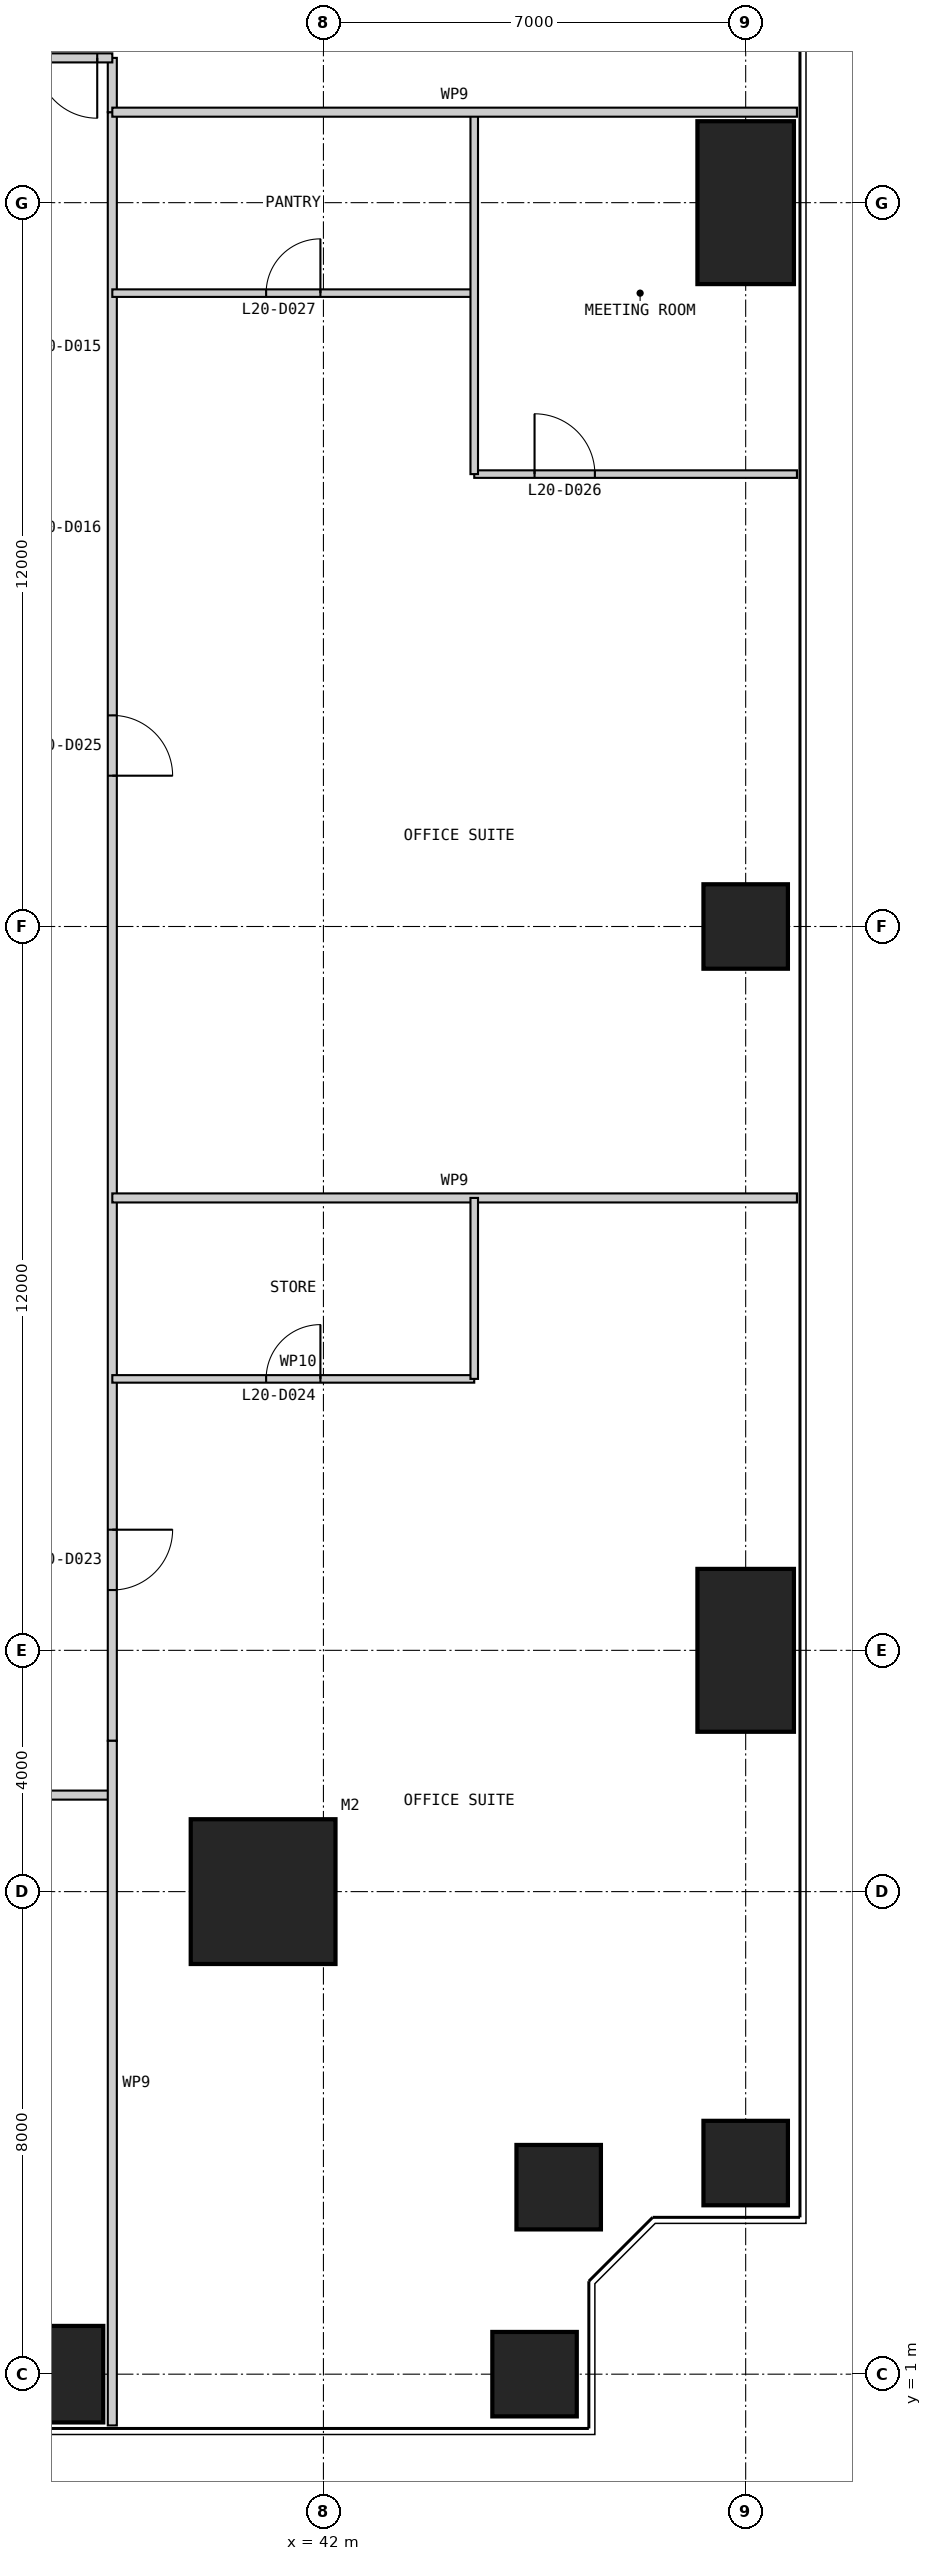
"""IFC4 building model, lengths in metres.
Left out: names, types, materials, properties, quantities, classifications, styles, units other than length and angle.
Written with IfcOpenShell. Run it as: python <this file> out.ifc"""

import sys

from ifc_helpers import new_model, si_unit, direction, frame, frame_2d, origin, origin_2d, place, context, subcontext, project, spatial, rectangle, extrude, element, fill, save


model = new_model("IFC4")
c1 = context("Model", 3, precision=1e-05, world=origin(), true_north=direction((0.0, 1.0)))
c2 = subcontext(c1, "Body", "Model", "MODEL_VIEW")
j1 = project(units=[si_unit("LENGTHUNIT", "METRE"), si_unit("PLANEANGLEUNIT", "RADIAN")], contexts=[c1])
p1 = place(None, origin())
s1 = spatial("IfcSite", under=j1, at=p1, CompositionType="ELEMENT")
p2 = place(p1, origin())
s2 = spatial("IfcBuilding", under=s1, at=p2, CompositionType="ELEMENT")
p3 = place(p2, frame((0.0, 0.0, 87.0)))
s3 = spatial("IfcBuildingStorey", under=s2, at=p3, CompositionType="ELEMENT", Elevation=87.0)
p4 = place(p3, frame((41.0, 9.0, 0.0), z_axis=(0.0, 0.0, 1.0), x_axis=(1.0, 0.0, 0.0)))
e1 = element("IfcColumn", 1, at=p4, inside=s3, PredefinedType="COLUMN", context=c2, shape_type="SweptSolid", body=[
    extrude(rectangle(XDim=2.4, YDim=2.4, at=origin_2d()), origin(), (0.0, 0.0, 1.0), 4.0),
])
p5 = place(p3, frame((37.0, 1.0, 0.0), z_axis=(0.0, 0.0, 1.0), x_axis=(1.0, 0.0, 0.0)))
e2 = element("IfcColumn", 2, at=p5, inside=s3, PredefinedType="COLUMN", context=c2, shape_type="SweptSolid", body=[
    extrude(rectangle(XDim=2.7, YDim=1.6, at=origin_2d()), origin(), (0.0, 0.0, 1.0), 4.0),
])
for number, where, z_axis, x_axis in (
    (3, (45.5, 1.0, 0.0), (0.0, 0.0, 1.0), (1.0, 0.0, 0.0)),
    (4, (45.9, 4.1, 0.0), (0.0, 0.0, 1.0), (1.0, 0.0, 0.0)),
    (5, (49.0, 4.5, 0.0), (0.0, 0.0, 1.0), (1.0, 0.0, 0.0)),
):
    element("IfcColumn", number, at=place(p3, frame(where, z_axis=z_axis, x_axis=x_axis)), inside=s3, PredefinedType="COLUMN", context=c2, shape_type="SweptSolid", body=[
        extrude(rectangle(XDim=1.4, YDim=1.4, at=origin_2d()), origin(), (0.0, 0.0, 1.0), 4.0),
    ])
p6 = place(p3, frame((49.0, 13.0, 0.0), z_axis=(0.0, 0.0, 1.0), x_axis=(1.0, 0.0, 0.0)))
e6 = element("IfcColumn", 6, at=p6, inside=s3, PredefinedType="COLUMN", context=c2, shape_type="SweptSolid", body=[
    extrude(rectangle(XDim=1.6, YDim=2.7, at=origin_2d()), origin(), (0.0, 0.0, 1.0), 4.0),
])
p7 = place(p3, frame((49.0, 25.0, 0.0), z_axis=(0.0, 0.0, 1.0), x_axis=(1.0, 0.0, 0.0)))
e7 = element("IfcColumn", 7, at=p7, inside=s3, PredefinedType="COLUMN", context=c2, shape_type="SweptSolid", body=[
    extrude(rectangle(XDim=1.4, YDim=1.4, at=origin_2d()), origin(), (0.0, 0.0, 1.0), 4.0),
])
p8 = place(p3, frame((49.0, 37.0, 0.0), z_axis=(0.0, 0.0, 1.0), x_axis=(1.0, 0.0, 0.0)))
e8 = element("IfcColumn", 8, at=p8, inside=s3, PredefinedType="COLUMN", context=c2, shape_type="SweptSolid", body=[
    extrude(rectangle(XDim=1.6, YDim=2.7, at=origin_2d()), origin(), (0.0, 0.0, 1.0), 4.0),
])
p9 = place(p3, frame((10.6, 10.6, 0.0), z_axis=(0.0, 0.0, 1.0), x_axis=(1.0, 0.0, 0.0)))
e9 = element("IfcWall", 9, at=p9, inside=s3, PredefinedType="PARTITIONING", context=c2, shape_type="SweptSolid", body=[
    extrude(rectangle(XDim=27.9, YDim=0.15, at=frame_2d((13.95, 0.0))), origin(), (0.0, 0.0, 1.0), 3.8),
])
p10 = place(p9, frame((3.4, 0.0, 0.0)))
e10 = element("IfcOpeningElement", 10, at=p10, cuts=e9, PredefinedType="OPENING", context=c2, shape_type="SweptSolid", body=[
    extrude(rectangle(XDim=1.0, YDim=2.2, at=frame_2d((0.5, 1.1))), frame((0.0, 0.085, 0.0), z_axis=(0.0, -1.0, 0.0), x_axis=(1.0, 0.0, 0.0)), (0.0, 0.0, 1.0), 0.17),
])
p11 = place(p9, frame((10.15, 0.0, 0.0)))
e11 = element("IfcOpeningElement", 11, at=p11, cuts=e9, PredefinedType="OPENING", context=c2, shape_type="SweptSolid", body=[
    extrude(rectangle(XDim=1.0, YDim=2.2, at=frame_2d((0.5, 1.1))), frame((0.0, 0.085, 0.0), z_axis=(0.0, -1.0, 0.0), x_axis=(1.0, 0.0, 0.0)), (0.0, 0.0, 1.0), 0.17),
])
p12 = place(p9, frame((17.65, 0.0, 0.0)))
e12 = element("IfcOpeningElement", 12, at=p12, cuts=e9, PredefinedType="OPENING", context=c2, shape_type="SweptSolid", body=[
    extrude(rectangle(XDim=1.0, YDim=2.2, at=frame_2d((0.5, 1.1))), frame((0.0, 0.085, 0.0), z_axis=(0.0, -1.0, 0.0), x_axis=(1.0, 0.0, 0.0)), (0.0, 0.0, 1.0), 0.17),
])
p13 = place(p9, frame((24.4, 0.0, 0.0)))
e13 = element("IfcOpeningElement", 13, at=p13, cuts=e9, PredefinedType="OPENING", context=c2, shape_type="SweptSolid", body=[
    extrude(rectangle(XDim=1.0, YDim=2.2, at=frame_2d((0.5, 1.1))), frame((0.0, 0.085, 0.0), z_axis=(0.0, -1.0, 0.0), x_axis=(1.0, 0.0, 0.0)), (0.0, 0.0, 1.0), 0.17),
])
p14 = place(p3, frame((38.5, 11.5, 0.0), z_axis=(0.0, 0.0, 1.0), x_axis=(0.0, 1.0, 0.0)))
e14 = element("IfcWall", 14, at=p14, inside=s3, PredefinedType="PARTITIONING", context=c2, shape_type="SweptSolid", body=[
    extrude(rectangle(XDim=27.0, YDim=0.15, at=frame_2d((13.5, 0.0))), origin(), (0.0, 0.0, 1.0), 3.8),
])
p15 = place(p14, frame((2.5, 0.0, 0.0)))
e15 = element("IfcOpeningElement", 15, at=p15, cuts=e14, PredefinedType="OPENING", context=c2, shape_type="SweptSolid", body=[
    extrude(rectangle(XDim=1.0, YDim=2.2, at=frame_2d((0.5, 1.1))), frame((0.0, 0.085, 0.0), z_axis=(0.0, -1.0, 0.0), x_axis=(1.0, 0.0, 0.0)), (0.0, 0.0, 1.0), 0.17),
])
p16 = place(p14, frame((16.0, 0.0, 0.0)))
e16 = element("IfcOpeningElement", 16, at=p16, cuts=e14, PredefinedType="OPENING", context=c2, shape_type="SweptSolid", body=[
    extrude(rectangle(XDim=1.0, YDim=2.2, at=frame_2d((0.5, 1.1))), frame((0.0, 0.085, 0.0), z_axis=(0.0, -1.0, 0.0), x_axis=(1.0, 0.0, 0.0)), (0.0, 0.0, 1.0), 0.17),
])
p17 = place(p3, frame((38.5, 0.15, 0.0), z_axis=(0.0, 0.0, 1.0), x_axis=(0.0, 1.0, 0.0)))
e17 = element("IfcWall", 17, at=p17, inside=s3, PredefinedType="PARTITIONING", context=c2, shape_type="SweptSolid", body=[
    extrude(rectangle(XDim=11.35, YDim=0.15, at=frame_2d((5.675, 0.0))), origin(), (0.0, 0.0, 1.0), 3.8),
])
p18 = place(p3, frame((44.5, 17.5, 0.0), z_axis=(0.0, 0.0, 1.0), x_axis=(-1.0, 0.0, 0.0)))
e18 = element("IfcWall", 18, at=p18, inside=s3, PredefinedType="PARTITIONING", context=c2, shape_type="SweptSolid", body=[
    extrude(rectangle(XDim=6.0, YDim=0.125, at=frame_2d((3.0, 0.0))), origin(), (0.0, 0.0, 1.0), 3.8),
])
p19 = place(p18, frame((2.55, 0.0, 0.0)))
e19 = element("IfcOpeningElement", 19, at=p19, cuts=e18, PredefinedType="OPENING", context=c2, shape_type="SweptSolid", body=[
    extrude(rectangle(XDim=0.9, YDim=2.2, at=frame_2d((0.45, 1.1))), frame((0.0, 0.073, 0.0), z_axis=(0.0, -1.0, 0.0), x_axis=(1.0, 0.0, 0.0)), (0.0, 0.0, 1.0), 0.145),
])
p20 = place(p3, frame((49.85, 20.5, 0.0), z_axis=(0.0, 0.0, 1.0), x_axis=(-1.0, 0.0, 0.0)))
e20 = element("IfcWall", 20, at=p20, inside=s3, PredefinedType="PARTITIONING", context=c2, shape_type="SweptSolid", body=[
    extrude(rectangle(XDim=11.35, YDim=0.15, at=frame_2d((5.675, 0.0))), origin(), (0.0, 0.0, 1.0), 3.8),
])
p21 = place(p3, frame((49.85, 32.5, 0.0), z_axis=(0.0, 0.0, 1.0), x_axis=(-1.0, 0.0, 0.0)))
e21 = element("IfcWall", 21, at=p21, inside=s3, PredefinedType="PARTITIONING", context=c2, shape_type="SweptSolid", body=[
    extrude(rectangle(XDim=5.35, YDim=0.125, at=frame_2d((2.675, 0.0))), origin(), (0.0, 0.0, 1.0), 3.8),
])
p22 = place(p21, frame((3.35, 0.0, 0.0)))
e22 = element("IfcOpeningElement", 22, at=p22, cuts=e21, PredefinedType="OPENING", context=c2, shape_type="SweptSolid", body=[
    extrude(rectangle(XDim=1.0, YDim=2.2, at=frame_2d((0.5, 1.1))), frame((0.0, 0.073, 0.0), z_axis=(0.0, -1.0, 0.0), x_axis=(1.0, 0.0, 0.0)), (0.0, 0.0, 1.0), 0.145),
])
p23 = place(p3, frame((44.5, 35.5, 0.0), z_axis=(0.0, 0.0, 1.0), x_axis=(-1.0, 0.0, 0.0)))
e23 = element("IfcWall", 23, at=p23, inside=s3, PredefinedType="PARTITIONING", context=c2, shape_type="SweptSolid", body=[
    extrude(rectangle(XDim=6.0, YDim=0.125, at=frame_2d((3.0, 0.0))), origin(), (0.0, 0.0, 1.0), 3.8),
])
p24 = place(p23, frame((2.55, 0.0, 0.0)))
e24 = element("IfcOpeningElement", 24, at=p24, cuts=e23, PredefinedType="OPENING", context=c2, shape_type="SweptSolid", body=[
    extrude(rectangle(XDim=0.9, YDim=2.2, at=frame_2d((0.45, 1.1))), frame((0.0, 0.073, 0.0), z_axis=(0.0, -1.0, 0.0), x_axis=(1.0, 0.0, 0.0)), (0.0, 0.0, 1.0), 0.145),
])
p25 = place(p3, frame((44.5, 17.5, 0.0), z_axis=(0.0, 0.0, 1.0), x_axis=(0.0, 1.0, 0.0)))
e25 = element("IfcWall", 25, at=p25, inside=s3, PredefinedType="PARTITIONING", context=c2, shape_type="SweptSolid", body=[
    extrude(rectangle(XDim=3.0, YDim=0.125, at=frame_2d((1.5, 0.0))), origin(), (0.0, 0.0, 1.0), 3.8),
])
p26 = place(p3, frame((44.5, 32.5, 0.0), z_axis=(0.0, 0.0, 1.0), x_axis=(0.0, 1.0, 0.0)))
e26 = element("IfcWall", 26, at=p26, inside=s3, PredefinedType="PARTITIONING", context=c2, shape_type="SweptSolid", body=[
    extrude(rectangle(XDim=6.0, YDim=0.125, at=frame_2d((3.0, 0.0))), origin(), (0.0, 0.0, 1.0), 3.8),
])
p27 = place(p3, frame((38.5, 38.5, 0.0), z_axis=(0.0, 0.0, 1.0), x_axis=(0.0, 1.0, 0.0)))
e27 = element("IfcWall", 27, at=p27, inside=s3, PredefinedType="PARTITIONING", context=c2, shape_type="SweptSolid", body=[
    extrude(rectangle(XDim=0.9, YDim=0.15, at=frame_2d((0.45, 0.0))), origin(), (0.0, 0.0, 1.0), 3.8),
])
p28 = place(p3, frame((38.5, 39.4, 0.0), z_axis=(0.0, 0.0, 1.0), x_axis=(-1.0, 0.0, 0.0)))
e28 = element("IfcWall", 28, at=p28, inside=s3, PredefinedType="PARTITIONING", context=c2, shape_type="SweptSolid", body=[
    extrude(rectangle(XDim=27.9, YDim=0.15, at=frame_2d((13.95, 0.0))), origin(), (0.0, 0.0, 1.0), 3.8),
])
p29 = place(p28, frame((0.25, 0.0, 0.0)))
e29 = element("IfcOpeningElement", 29, at=p29, cuts=e28, PredefinedType="OPENING", context=c2, shape_type="SweptSolid", body=[
    extrude(rectangle(XDim=1.0, YDim=2.2, at=frame_2d((0.5, 1.1))), frame((0.0, 0.085, 0.0), z_axis=(0.0, -1.0, 0.0), x_axis=(1.0, 0.0, 0.0)), (0.0, 0.0, 1.0), 0.17),
])
p30 = place(p28, frame((22.75, 0.0, 0.0)))
e30 = element("IfcOpeningElement", 30, at=p30, cuts=e28, PredefinedType="OPENING", context=c2, shape_type="SweptSolid", body=[
    extrude(rectangle(XDim=1.0, YDim=2.2, at=frame_2d((0.5, 1.1))), frame((0.0, 0.085, 0.0), z_axis=(0.0, -1.0, 0.0), x_axis=(1.0, 0.0, 0.0)), (0.0, 0.0, 1.0), 0.17),
])
p31 = place(p3, frame((49.85, 38.5, 0.0), z_axis=(0.0, 0.0, 1.0), x_axis=(-1.0, 0.0, 0.0)))
e31 = element("IfcWall", 31, at=p31, inside=s3, PredefinedType="PARTITIONING", context=c2, shape_type="SweptSolid", body=[
    extrude(rectangle(XDim=11.35, YDim=0.15, at=frame_2d((5.675, 0.0))), origin(), (0.0, 0.0, 1.0), 3.8),
])
p32 = place(p15, frame((1.0, 0.0, 0.0), z_axis=(0.0, 0.0, 1.0), x_axis=(-1.0, 0.0, 0.0)))
e32 = element("IfcDoor", 32, at=p32, inside=s3, OperationType="SINGLE_SWING_LEFT", PredefinedType="DOOR", context=c2, shape_type="SweptSolid", body=[
    extrude(rectangle(XDim=1.0, YDim=2.2, at=frame_2d((0.5, 1.1))), frame((0.0, 0.025, 0.0), z_axis=(0.0, -1.0, 0.0), x_axis=(1.0, 0.0, 0.0)), (0.0, 0.0, 1.0), 0.05),
])
fill(e15, e32)
p33 = place(p19, frame((0.9, 0.0, 0.0), z_axis=(0.0, 0.0, 1.0), x_axis=(-1.0, 0.0, 0.0)))
e33 = element("IfcDoor", 33, at=p33, inside=s3, OperationType="SINGLE_SWING_RIGHT", PredefinedType="DOOR", context=c2, shape_type="SweptSolid", body=[
    extrude(rectangle(XDim=0.9, YDim=2.2, at=frame_2d((0.45, 1.1))), frame((0.0, 0.025, 0.0), z_axis=(0.0, -1.0, 0.0), x_axis=(1.0, 0.0, 0.0)), (0.0, 0.0, 1.0), 0.05),
])
fill(e19, e33)
p34 = place(p16, frame((1.0, 0.0, 0.0), z_axis=(0.0, 0.0, 1.0), x_axis=(-1.0, 0.0, 0.0)))
e34 = element("IfcDoor", 34, at=p34, inside=s3, OperationType="SINGLE_SWING_RIGHT", PredefinedType="DOOR", context=c2, shape_type="SweptSolid", body=[
    extrude(rectangle(XDim=1.0, YDim=2.2, at=frame_2d((0.5, 1.1))), frame((0.0, 0.025, 0.0), z_axis=(0.0, -1.0, 0.0), x_axis=(1.0, 0.0, 0.0)), (0.0, 0.0, 1.0), 0.05),
])
fill(e16, e34)
p35 = place(p22, frame((1.0, 0.0, 0.0), z_axis=(0.0, 0.0, 1.0), x_axis=(-1.0, 0.0, 0.0)))
e35 = element("IfcDoor", 35, at=p35, inside=s3, OperationType="SINGLE_SWING_LEFT", PredefinedType="DOOR", context=c2, shape_type="SweptSolid", body=[
    extrude(rectangle(XDim=1.0, YDim=2.2, at=frame_2d((0.5, 1.1))), frame((0.0, 0.025, 0.0), z_axis=(0.0, -1.0, 0.0), x_axis=(1.0, 0.0, 0.0)), (0.0, 0.0, 1.0), 0.05),
])
fill(e22, e35)
p36 = place(p24, frame((0.9, 0.0, 0.0), z_axis=(0.0, 0.0, 1.0), x_axis=(-1.0, 0.0, 0.0)))
e36 = element("IfcDoor", 36, at=p36, inside=s3, OperationType="SINGLE_SWING_RIGHT", PredefinedType="DOOR", context=c2, shape_type="SweptSolid", body=[
    extrude(rectangle(XDim=0.9, YDim=2.2, at=frame_2d((0.45, 1.1))), frame((0.0, 0.025, 0.0), z_axis=(0.0, -1.0, 0.0), x_axis=(1.0, 0.0, 0.0)), (0.0, 0.0, 1.0), 0.05),
])
fill(e24, e36)
p37 = place(p29, origin())
e37 = element("IfcDoor", 37, at=p37, inside=s3, OperationType="SINGLE_SWING_LEFT", PredefinedType="DOOR", context=c2, shape_type="SweptSolid", body=[
    extrude(rectangle(XDim=1.0, YDim=2.2, at=frame_2d((0.5, 1.1))), frame((0.0, 0.025, 0.0), z_axis=(0.0, -1.0, 0.0), x_axis=(1.0, 0.0, 0.0)), (0.0, 0.0, 1.0), 0.05),
])
fill(e29, e37)
save(model, sys.argv[1])
